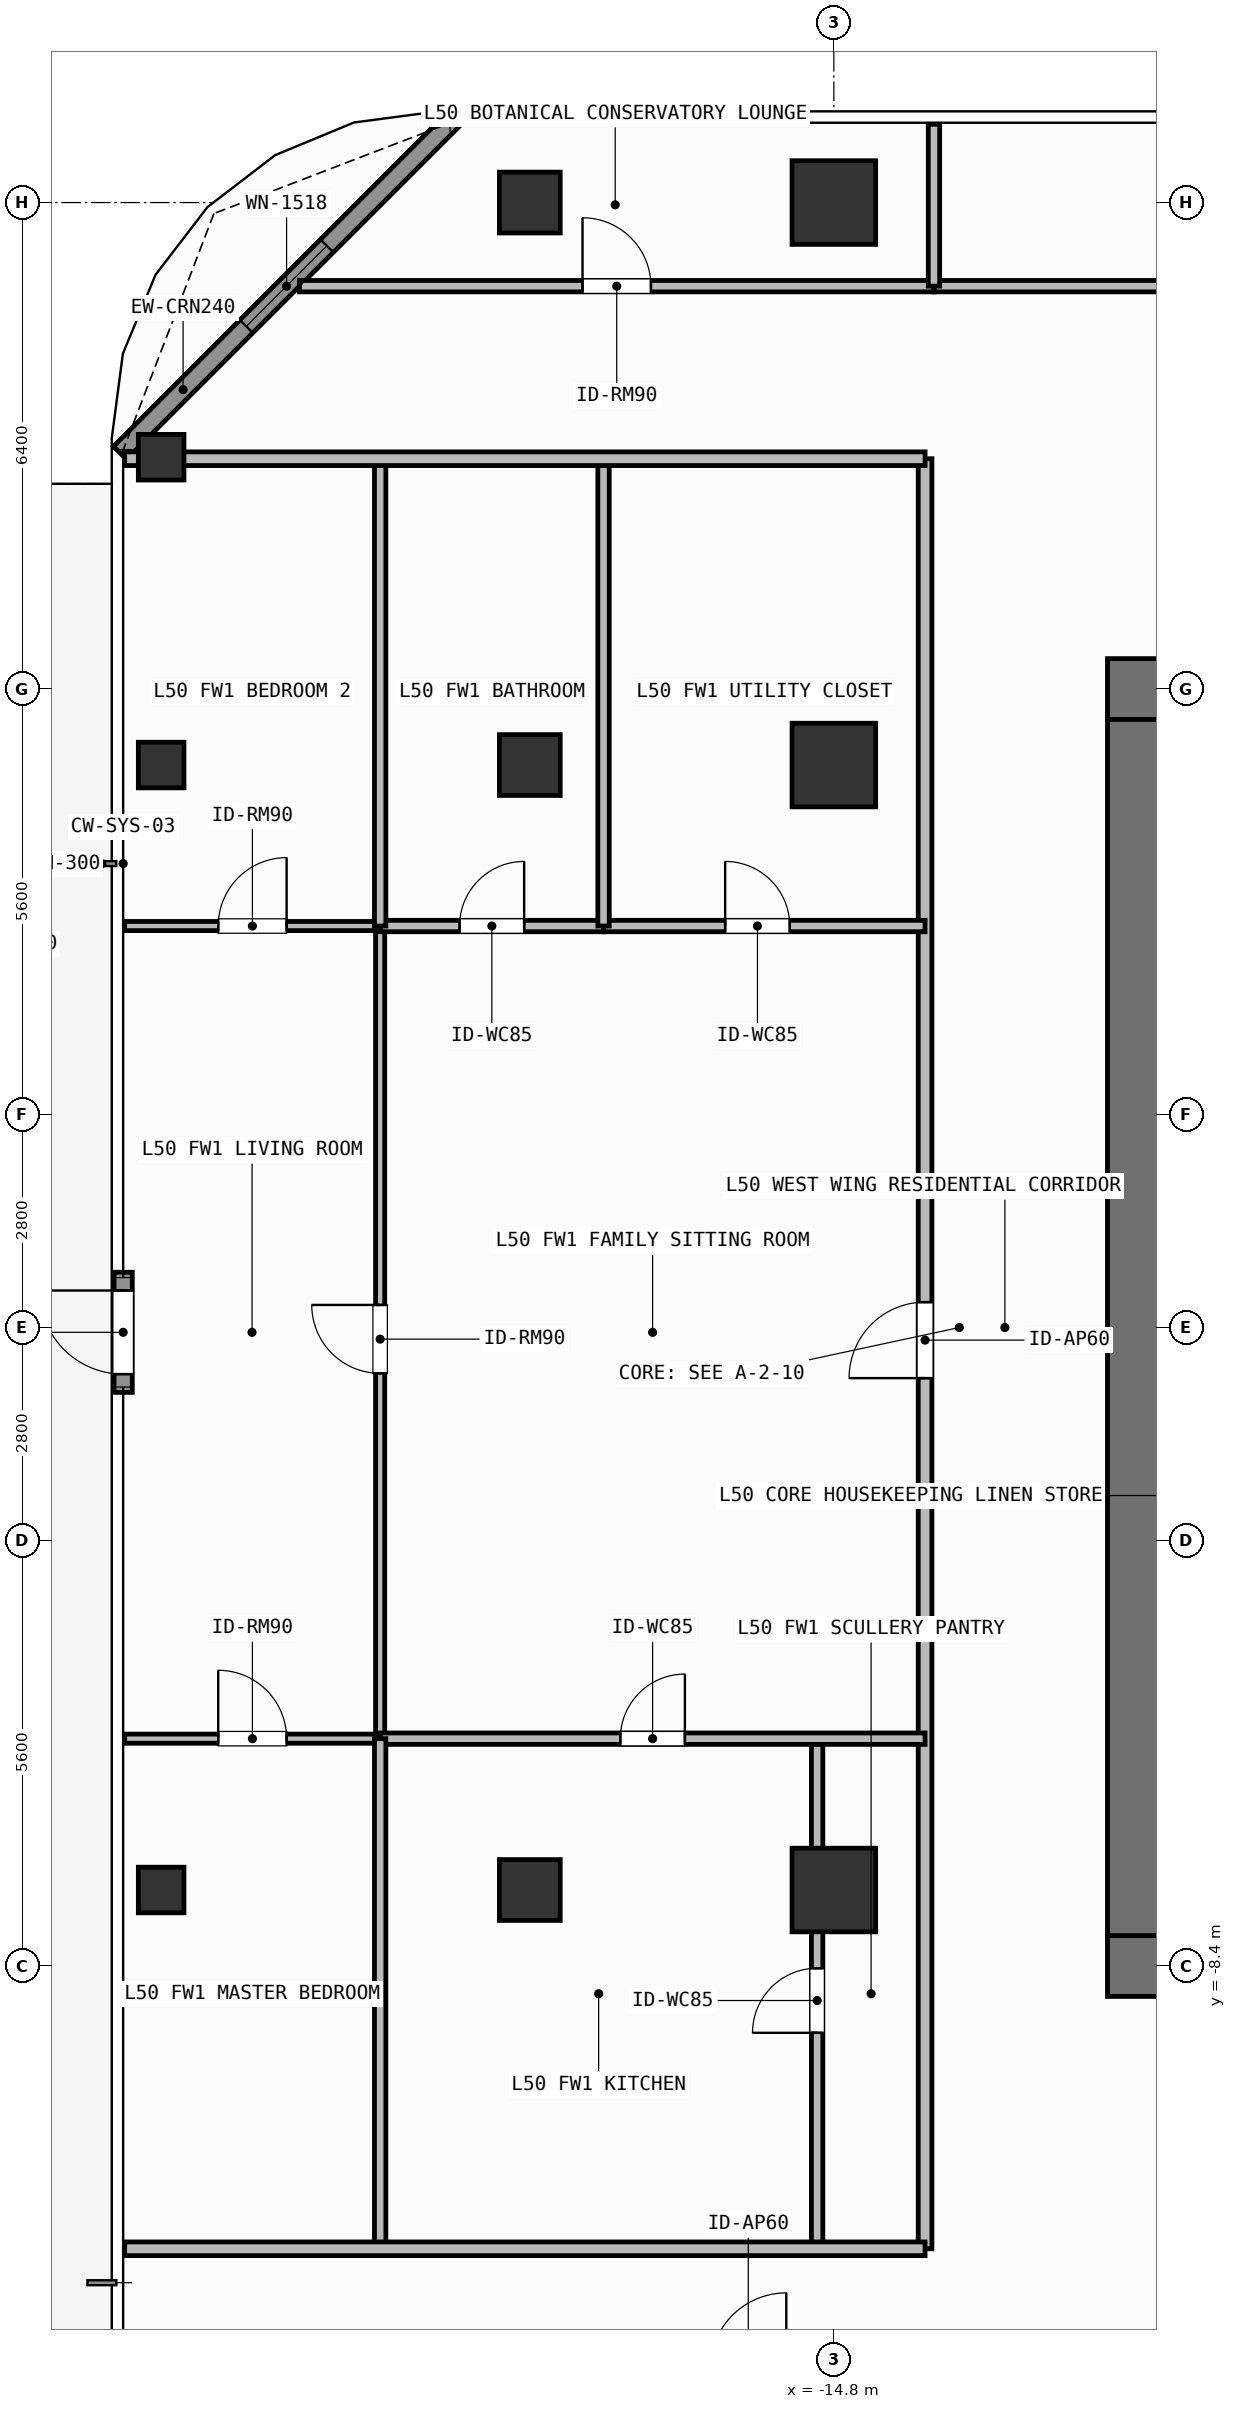
"""IFC4 building model, lengths in metres.
Left out: names, types, materials, properties, quantities, classifications, styles, units other than length and angle.
Written with IfcOpenShell. Run it as: python <this file> out.ifc"""

import sys

from ifc_helpers import new_model, si_unit, direction, frame, frame_2d, origin, origin_2d, place, context, subcontext, project, spatial, rectangle, hollow_rectangle, extrude, element, fill, save


model = new_model("IFC4")
c1 = context("Model", 3, precision=1e-05, world=origin(), true_north=direction((0.0, 1.0)))
c2 = subcontext(c1, "Body", "Model", "MODEL_VIEW")
j1 = project(units=[si_unit("LENGTHUNIT", "METRE"), si_unit("PLANEANGLEUNIT", "RADIAN")], contexts=[c1])
p1 = place(None, origin())
s1 = spatial("IfcSite", under=j1, at=p1, CompositionType="ELEMENT")
p2 = place(p1, origin())
s2 = spatial("IfcBuilding", under=s1, at=p2, CompositionType="ELEMENT")
p3 = place(p2, frame((0.0, 0.0, 203.1)))
s3 = spatial("IfcBuildingStorey", under=s2, at=p3, CompositionType="ELEMENT", Elevation=203.1)
for number, where, z_axis, x_axis in (
    (1, (-11.2, -8.4, 0.0), (0.0, 0.0, 1.0), (1.0, 0.0, 0.0)),
    (2, (-11.2, 8.4, 0.0), (0.0, 0.0, 1.0), (1.0, 0.0, 0.0)),
):
    element("IfcWall", number, at=place(p3, frame(where, z_axis=z_axis, x_axis=x_axis)), inside=s3, PredefinedType="SHEAR", context=c2, shape_type="SweptSolid", body=[
        extrude(rectangle(XDim=1.5, YDim=0.8, at=frame_2d((0.75, 0.0))), origin(), (0.0, 0.0, 1.0), 3.9),
    ])
p4 = place(p3, frame((-10.8, -8.0, 0.0), z_axis=(0.0, 0.0, 1.0), x_axis=(0.0, 1.0, 0.0)))
e3 = element("IfcWall", 3, at=p4, inside=s3, PredefinedType="SHEAR", context=c2, shape_type="SweptSolid", body=[
    extrude(rectangle(XDim=16.0, YDim=0.8, at=frame_2d((8.0, 0.0))), origin(), (0.0, 0.0, 1.0), 3.9),
])
for number, where, z_axis, x_axis in (
    (4, (-14.8, 14.8, 0.0), (0.0, 0.0, 1.0), (1.0, 0.0, 0.0)),
    (5, (-14.8, -7.4, 0.0), (0.0, 0.0, 1.0), (1.0, 0.0, 0.0)),
    (6, (-14.8, 7.4, 0.0), (0.0, 0.0, 1.0), (1.0, 0.0, 0.0)),
):
    element("IfcColumn", number, at=place(p3, frame(where, z_axis=z_axis, x_axis=x_axis)), inside=s3, PredefinedType="COLUMN", context=c2, shape_type="SweptSolid", body=[
        extrude(rectangle(XDim=1.1, YDim=1.1, at=origin_2d()), origin(), (0.0, 0.0, 1.0), 3.9),
    ])
for number, where, z_axis, x_axis in (
    (7, (-18.8, -7.4, 0.0), (0.0, 0.0, 1.0), (1.0, 0.0, 0.0)),
    (8, (-18.8, 7.4, 0.0), (0.0, 0.0, 1.0), (1.0, 0.0, 0.0)),
    (9, (-18.8, 14.8, 0.0), (0.0, 0.0, 1.0), (1.0, 0.0, 0.0)),
):
    element("IfcColumn", number, at=place(p3, frame(where, z_axis=z_axis, x_axis=x_axis)), inside=s3, PredefinedType="COLUMN", context=c2, shape_type="SweptSolid", body=[
        extrude(hollow_rectangle(XDim=0.8, YDim=0.8, WallThickness=0.036, at=origin_2d()), origin(), (0.0, 0.0, 1.0), 3.9),
    ])
for number, where, z_axis, x_axis in (
    (10, (-23.65, 11.45, 0.0), (0.0, 0.0, 1.0), (1.0, 0.0, 0.0)),
    (11, (-23.65, -7.4, 0.0), (0.0, 0.0, 1.0), (1.0, 0.0, 0.0)),
    (12, (-23.65, 7.4, 0.0), (0.0, 0.0, 1.0), (1.0, 0.0, 0.0)),
):
    element("IfcColumn", number, at=place(p3, frame(where, z_axis=z_axis, x_axis=x_axis)), inside=s3, PredefinedType="COLUMN", context=c2, shape_type="SweptSolid", body=[
        extrude(hollow_rectangle(XDim=0.6, YDim=0.6, WallThickness=0.028, at=origin_2d()), origin(), (0.0, 0.0, 1.0), 3.9),
    ])
p5 = place(p3, frame((-24.15, -0.853, 0.0), z_axis=(0.0, 0.0, 1.0), x_axis=(0.0, 1.0, 0.0)))
e13 = element("IfcWall", 13, at=p5, inside=s3, PredefinedType="SOLIDWALL", context=c2, shape_type="SweptSolid", body=[
    extrude(rectangle(XDim=1.58, YDim=0.24, at=frame_2d((0.79, 0.0))), origin(), (0.0, 0.0, 1.0), 3.68),
])
p6 = place(p5, frame((0.24, 0.0, 0.0)))
e14 = element("IfcOpeningElement", 14, at=p6, cuts=e13, PredefinedType="OPENING", context=c2, shape_type="SweptSolid", body=[
    extrude(rectangle(XDim=1.1, YDim=2.2, at=frame_2d((0.55, 1.1))), frame((0.0, 0.13, 0.0), z_axis=(0.0, -1.0, 0.0), x_axis=(1.0, 0.0, 0.0)), (0.0, 0.0, 1.0), 0.26),
])
p7 = place(p3, frame((-24.192, 11.508, 0.0), z_axis=(0.0, 0.0, 1.0), x_axis=(0.707106781187, 0.707106781187, 0.0)))
e15 = element("IfcWall", 15, at=p7, inside=s3, PredefinedType="SOLIDWALL", context=c2, shape_type="SweptSolid", body=[
    extrude(rectangle(XDim=6.201, YDim=0.24, at=frame_2d((3.101, 0.0))), origin(), (0.0, 0.0, 1.0), 3.68),
])
p8 = place(p7, frame((2.351, 0.0, 0.8)))
e16 = element("IfcOpeningElement", 16, at=p8, cuts=e15, PredefinedType="OPENING", context=c2, shape_type="SweptSolid", body=[
    extrude(rectangle(XDim=1.5, YDim=1.85, at=frame_2d((0.75, 0.925))), frame((0.0, 0.13, 0.0), z_axis=(0.0, -1.0, 0.0), x_axis=(1.0, 0.0, 0.0)), (0.0, 0.0, 1.0), 0.26),
])
p9 = place(p3, frame((-21.83, 13.7, 0.0), z_axis=(0.0, 0.0, 1.0), x_axis=(1.0, 0.0, 0.0)))
e17 = element("IfcWall", 17, at=p9, inside=s3, PredefinedType="PARTITIONING", context=c2, shape_type="SweptSolid", body=[
    extrude(rectangle(XDim=8.347, YDim=0.15, at=frame_2d((4.174, 0.0))), origin(), (0.0, 0.0, 1.0), 3.68),
])
p10 = place(p9, frame((3.723, 0.0, 0.0)))
e18 = element("IfcOpeningElement", 18, at=p10, cuts=e17, PredefinedType="OPENING", context=c2, shape_type="SweptSolid", body=[
    extrude(rectangle(XDim=0.9, YDim=2.1, at=frame_2d((0.45, 1.05))), frame((0.0, 0.085, 0.0), z_axis=(0.0, -1.0, 0.0), x_axis=(1.0, 0.0, 0.0)), (0.0, 0.0, 1.0), 0.17),
])
p11 = place(p3, frame((-13.483, 13.7, 0.0), z_axis=(0.0, 0.0, 1.0), x_axis=(1.0, 0.0, 0.0)))
e19 = element("IfcWall", 19, at=p11, inside=s3, PredefinedType="PARTITIONING", context=c2, shape_type="SweptSolid", body=[
    extrude(rectangle(XDim=13.58, YDim=0.15, at=frame_2d((6.79, 0.0))), origin(), (0.0, 0.0, 1.0), 3.68),
])
p12 = place(p11, frame((6.788, 0.0, 0.0)))
e20 = element("IfcOpeningElement", 20, at=p12, cuts=e19, PredefinedType="OPENING", context=c2, shape_type="SweptSolid", body=[
    extrude(rectangle(XDim=0.9, YDim=2.1, at=frame_2d((0.45, 1.05))), frame((0.0, 0.085, 0.0), z_axis=(0.0, -1.0, 0.0), x_axis=(1.0, 0.0, 0.0)), (0.0, 0.0, 1.0), 0.17),
])
p13 = place(p3, frame((-13.6, -12.12, 0.0), z_axis=(0.0, 0.0, 1.0), x_axis=(0.0, 1.0, 0.0)))
e21 = element("IfcWall", 21, at=p13, inside=s3, PredefinedType="PARTITIONING", context=c2, shape_type="SweptSolid", body=[
    extrude(rectangle(XDim=23.55, YDim=0.18, at=frame_2d((11.775, 0.0))), origin(), (0.0, 0.0, 1.0), 3.68),
])
p14 = place(p13, frame((11.454, 0.0, 0.0)))
e22 = element("IfcOpeningElement", 22, at=p14, cuts=e21, PredefinedType="OPENING", context=c2, shape_type="SweptSolid", body=[
    extrude(rectangle(XDim=1.0, YDim=2.2, at=frame_2d((0.5, 1.1))), frame((0.0, 0.1, 0.0), z_axis=(0.0, -1.0, 0.0), x_axis=(1.0, 0.0, 0.0)), (0.0, 0.0, 1.0), 0.2),
])
p15 = place(p3, frame((-20.769, -5.409, 0.0), z_axis=(0.0, 0.0, 1.0), x_axis=(0.0, 1.0, 0.0)))
e23 = element("IfcWall", 23, at=p15, inside=s3, PredefinedType="PARTITIONING", context=c2, shape_type="SweptSolid", body=[
    extrude(rectangle(XDim=10.691, YDim=0.12, at=frame_2d((5.345, 0.0))), origin(), (0.0, 0.0, 1.0), 3.68),
])
p16 = place(p15, frame((4.806, 0.0, 0.0)))
e24 = element("IfcOpeningElement", 24, at=p16, cuts=e23, PredefinedType="OPENING", context=c2, shape_type="SweptSolid", body=[
    extrude(rectangle(XDim=0.9, YDim=2.1, at=frame_2d((0.45, 1.05))), frame((0.0, 0.07, 0.0), z_axis=(0.0, -1.0, 0.0), x_axis=(1.0, 0.0, 0.0)), (0.0, 0.0, 1.0), 0.14),
])
p17 = place(p3, frame((-15.02, -12.12, 0.0), z_axis=(0.0, 0.0, 1.0), x_axis=(0.0, 1.0, 0.0)))
e25 = element("IfcWall", 25, at=p17, inside=s3, PredefinedType="PARTITIONING", context=c2, shape_type="SweptSolid", body=[
    extrude(rectangle(XDim=6.711, YDim=0.15, at=frame_2d((3.355, 0.0))), origin(), (0.0, 0.0, 1.0), 3.182),
])
p18 = place(p17, frame((2.841, 0.0, 0.0)))
e26 = element("IfcOpeningElement", 26, at=p18, cuts=e25, PredefinedType="OPENING", context=c2, shape_type="SweptSolid", body=[
    extrude(rectangle(XDim=0.85, YDim=2.1, at=frame_2d((0.425, 1.05))), frame((0.0, 0.085, 0.0), z_axis=(0.0, -1.0, 0.0), x_axis=(1.0, 0.0, 0.0)), (0.0, 0.0, 1.0), 0.17),
])
p19 = place(p3, frame((-20.769, 5.282, 0.0), z_axis=(0.0, 0.0, 1.0), x_axis=(1.0, 0.0, 0.0)))
e27 = element("IfcWall", 27, at=p19, inside=s3, PredefinedType="PARTITIONING", context=c2, shape_type="SweptSolid", body=[
    extrude(rectangle(XDim=2.939, YDim=0.15, at=frame_2d((1.469, 0.0))), origin(), (0.0, 0.0, 1.0), 3.68),
])
p20 = place(p19, frame((1.044, 0.0, 0.0)))
e28 = element("IfcOpeningElement", 28, at=p20, cuts=e27, PredefinedType="OPENING", context=c2, shape_type="SweptSolid", body=[
    extrude(rectangle(XDim=0.85, YDim=2.1, at=frame_2d((0.425, 1.05))), frame((0.0, 0.085, 0.0), z_axis=(0.0, -1.0, 0.0), x_axis=(1.0, 0.0, 0.0)), (0.0, 0.0, 1.0), 0.17),
])
p21 = place(p3, frame((-17.83, 5.282, 0.0), z_axis=(0.0, 0.0, 1.0), x_axis=(1.0, 0.0, 0.0)))
e29 = element("IfcWall", 29, at=p21, inside=s3, PredefinedType="PARTITIONING", context=c2, shape_type="SweptSolid", body=[
    extrude(rectangle(XDim=4.23, YDim=0.15, at=frame_2d((2.115, 0.0))), origin(), (0.0, 0.0, 1.0), 3.68),
])
p22 = place(p21, frame((1.6, 0.0, 0.0)))
e30 = element("IfcOpeningElement", 30, at=p22, cuts=e29, PredefinedType="OPENING", context=c2, shape_type="SweptSolid", body=[
    extrude(rectangle(XDim=0.85, YDim=2.1, at=frame_2d((0.425, 1.05))), frame((0.0, 0.085, 0.0), z_axis=(0.0, -1.0, 0.0), x_axis=(1.0, 0.0, 0.0)), (0.0, 0.0, 1.0), 0.17),
])
p23 = place(p3, frame((-20.769, -5.409, 0.0), z_axis=(0.0, 0.0, 1.0), x_axis=(1.0, 0.0, 0.0)))
e31 = element("IfcWall", 31, at=p23, inside=s3, PredefinedType="PARTITIONING", context=c2, shape_type="SweptSolid", body=[
    extrude(rectangle(XDim=7.169, YDim=0.15, at=frame_2d((3.584, 0.0))), origin(), (0.0, 0.0, 1.0), 3.68),
])
p24 = place(p23, frame((3.159, 0.0, 0.0)))
e32 = element("IfcOpeningElement", 32, at=p24, cuts=e31, PredefinedType="OPENING", context=c2, shape_type="SweptSolid", body=[
    extrude(rectangle(XDim=0.85, YDim=2.1, at=frame_2d((0.425, 1.05))), frame((0.0, 0.085, 0.0), z_axis=(0.0, -1.0, 0.0), x_axis=(1.0, 0.0, 0.0)), (0.0, 0.0, 1.0), 0.17),
])
p25 = place(p3, frame((-24.13, -5.409, 0.0), z_axis=(0.0, 0.0, 1.0), x_axis=(1.0, 0.0, 0.0)))
e33 = element("IfcWall", 33, at=p25, inside=s3, PredefinedType="PARTITIONING", context=c2, shape_type="SweptSolid", body=[
    extrude(rectangle(XDim=3.361, YDim=0.12, at=frame_2d((1.68, 0.0))), origin(), (0.0, 0.0, 1.0), 3.68),
])
p26 = place(p25, frame((1.23, 0.0, 0.0)))
e34 = element("IfcOpeningElement", 34, at=p26, cuts=e33, PredefinedType="OPENING", context=c2, shape_type="SweptSolid", body=[
    extrude(rectangle(XDim=0.9, YDim=2.1, at=frame_2d((0.45, 1.05))), frame((0.0, 0.07, 0.0), z_axis=(0.0, -1.0, 0.0), x_axis=(1.0, 0.0, 0.0)), (0.0, 0.0, 1.0), 0.14),
])
p27 = place(p3, frame((-24.13, 5.282, 0.0), z_axis=(0.0, 0.0, 1.0), x_axis=(1.0, 0.0, 0.0)))
e35 = element("IfcWall", 35, at=p27, inside=s3, PredefinedType="PARTITIONING", context=c2, shape_type="SweptSolid", body=[
    extrude(rectangle(XDim=3.361, YDim=0.12, at=frame_2d((1.68, 0.0))), origin(), (0.0, 0.0, 1.0), 3.68),
])
p28 = place(p27, frame((1.23, 0.0, 0.0)))
e36 = element("IfcOpeningElement", 36, at=p28, cuts=e35, PredefinedType="OPENING", context=c2, shape_type="SweptSolid", body=[
    extrude(rectangle(XDim=0.9, YDim=2.1, at=frame_2d((0.45, 1.05))), frame((0.0, 0.07, 0.0), z_axis=(0.0, -1.0, 0.0), x_axis=(1.0, 0.0, 0.0)), (0.0, 0.0, 1.0), 0.14),
])
p29 = place(p3, frame((-13.483, 13.7, 0.0), z_axis=(0.0, 0.0, 1.0), x_axis=(0.0, 1.0, 0.0)))
e37 = element("IfcWall", 37, at=p29, inside=s3, PredefinedType="PARTITIONING", context=c2, shape_type="SweptSolid", body=[
    extrude(rectangle(XDim=2.13, YDim=0.15, at=frame_2d((1.065, 0.0))), origin(), (0.0, 0.0, 1.0), 3.68),
])
p30 = place(p3, frame((-17.83, 5.282, 0.0), z_axis=(0.0, 0.0, 1.0), x_axis=(0.0, 1.0, 0.0)))
e38 = element("IfcWall", 38, at=p30, inside=s3, PredefinedType="PARTITIONING", context=c2, shape_type="SweptSolid", body=[
    extrude(rectangle(XDim=6.148, YDim=0.15, at=frame_2d((3.074, 0.0))), origin(), (0.0, 0.0, 1.0), 3.68),
])
p31 = place(p3, frame((-20.769, -12.12, 0.0), z_axis=(0.0, 0.0, 1.0), x_axis=(0.0, 1.0, 0.0)))
e39 = element("IfcWall", 39, at=p31, inside=s3, PredefinedType="PARTITIONING", context=c2, shape_type="SweptSolid", body=[
    extrude(rectangle(XDim=6.711, YDim=0.15, at=frame_2d((3.355, 0.0))), origin(), (0.0, 0.0, 1.0), 3.68),
])
p32 = place(p3, frame((-20.769, 5.282, 0.0), z_axis=(0.0, 0.0, 1.0), x_axis=(0.0, 1.0, 0.0)))
e40 = element("IfcWall", 40, at=p32, inside=s3, PredefinedType="PARTITIONING", context=c2, shape_type="SweptSolid", body=[
    extrude(rectangle(XDim=6.148, YDim=0.15, at=frame_2d((3.074, 0.0))), origin(), (0.0, 0.0, 1.0), 3.68),
])
p33 = place(p3, frame((-24.13, -12.12, 0.0), z_axis=(0.0, 0.0, 1.0), x_axis=(1.0, 0.0, 0.0)))
e41 = element("IfcWall", 41, at=p33, inside=s3, PredefinedType="PARTITIONING", context=c2, shape_type="SweptSolid", body=[
    extrude(rectangle(XDim=10.53, YDim=0.18, at=frame_2d((5.265, 0.0))), origin(), (0.0, 0.0, 1.0), 3.68),
])
p34 = place(p3, frame((-24.13, 11.43, 0.0), z_axis=(0.0, 0.0, 1.0), x_axis=(1.0, 0.0, 0.0)))
e42 = element("IfcWall", 42, at=p34, inside=s3, PredefinedType="PARTITIONING", context=c2, shape_type="SweptSolid", body=[
    extrude(rectangle(XDim=10.53, YDim=0.18, at=frame_2d((5.265, 0.0))), origin(), (0.0, 0.0, 1.0), 3.42),
])
p35 = place(p6, origin())
e43 = element("IfcDoor", 43, at=p35, inside=s3, OperationType="SINGLE_SWING_RIGHT", PredefinedType="DOOR", context=c2, shape_type="SweptSolid", body=[
    extrude(rectangle(XDim=1.1, YDim=2.2, at=frame_2d((0.55, 1.1))), frame((0.0, 0.025, 0.0), z_axis=(0.0, -1.0, 0.0), x_axis=(1.0, 0.0, 0.0)), (0.0, 0.0, 1.0), 0.05),
])
fill(e14, e43)
p36 = place(p8, origin())
e44 = element("IfcWindow", 44, at=p36, inside=s3, PartitioningType="SINGLE_PANEL", PredefinedType="WINDOW", context=c2, shape_type="SweptSolid", body=[
    extrude(rectangle(XDim=1.5, YDim=1.85, at=frame_2d((0.75, 0.925))), frame((0.0, 0.03, 0.0), z_axis=(0.0, -1.0, 0.0), x_axis=(1.0, 0.0, 0.0)), (0.0, 0.0, 1.0), 0.06),
])
fill(e16, e44)
p37 = place(p10, origin())
e45 = element("IfcDoor", 45, at=p37, inside=s3, OperationType="SINGLE_SWING_LEFT", PredefinedType="DOOR", context=c2, shape_type="SweptSolid", body=[
    extrude(rectangle(XDim=0.9, YDim=2.1, at=frame_2d((0.45, 1.05))), frame((0.0, 0.025, 0.0), z_axis=(0.0, -1.0, 0.0), x_axis=(1.0, 0.0, 0.0)), (0.0, 0.0, 1.0), 0.05),
])
fill(e18, e45)
p38 = place(p14, origin())
e46 = element("IfcDoor", 46, at=p38, inside=s3, OperationType="SINGLE_SWING_LEFT", PredefinedType="DOOR", context=c2, shape_type="SweptSolid", body=[
    extrude(rectangle(XDim=1.0, YDim=2.2, at=frame_2d((0.5, 1.1))), frame((0.0, 0.025, 0.0), z_axis=(0.0, -1.0, 0.0), x_axis=(1.0, 0.0, 0.0)), (0.0, 0.0, 1.0), 0.05),
])
fill(e22, e46)
p39 = place(p16, origin())
e47 = element("IfcDoor", 47, at=p39, inside=s3, OperationType="SINGLE_SWING_RIGHT", PredefinedType="DOOR", context=c2, shape_type="SweptSolid", body=[
    extrude(rectangle(XDim=0.9, YDim=2.1, at=frame_2d((0.45, 1.05))), frame((0.0, 0.025, 0.0), z_axis=(0.0, -1.0, 0.0), x_axis=(1.0, 0.0, 0.0)), (0.0, 0.0, 1.0), 0.05),
])
fill(e24, e47)
p40 = place(p18, origin())
e48 = element("IfcDoor", 48, at=p40, inside=s3, OperationType="SINGLE_SWING_LEFT", PredefinedType="DOOR", context=c2, shape_type="SweptSolid", body=[
    extrude(rectangle(XDim=0.85, YDim=2.1, at=frame_2d((0.425, 1.05))), frame((0.0, 0.025, 0.0), z_axis=(0.0, -1.0, 0.0), x_axis=(1.0, 0.0, 0.0)), (0.0, 0.0, 1.0), 0.05),
])
fill(e26, e48)
p41 = place(p20, origin())
e49 = element("IfcDoor", 49, at=p41, inside=s3, OperationType="SINGLE_SWING_RIGHT", PredefinedType="DOOR", context=c2, shape_type="SweptSolid", body=[
    extrude(rectangle(XDim=0.85, YDim=2.1, at=frame_2d((0.425, 1.05))), frame((0.0, 0.025, 0.0), z_axis=(0.0, -1.0, 0.0), x_axis=(1.0, 0.0, 0.0)), (0.0, 0.0, 1.0), 0.05),
])
fill(e28, e49)
p42 = place(p22, origin())
e50 = element("IfcDoor", 50, at=p42, inside=s3, OperationType="SINGLE_SWING_LEFT", PredefinedType="DOOR", context=c2, shape_type="SweptSolid", body=[
    extrude(rectangle(XDim=0.85, YDim=2.1, at=frame_2d((0.425, 1.05))), frame((0.0, 0.025, 0.0), z_axis=(0.0, -1.0, 0.0), x_axis=(1.0, 0.0, 0.0)), (0.0, 0.0, 1.0), 0.05),
])
fill(e30, e50)
p43 = place(p24, origin())
e51 = element("IfcDoor", 51, at=p43, inside=s3, OperationType="SINGLE_SWING_RIGHT", PredefinedType="DOOR", context=c2, shape_type="SweptSolid", body=[
    extrude(rectangle(XDim=0.85, YDim=2.1, at=frame_2d((0.425, 1.05))), frame((0.0, 0.025, 0.0), z_axis=(0.0, -1.0, 0.0), x_axis=(1.0, 0.0, 0.0)), (0.0, 0.0, 1.0), 0.05),
])
fill(e32, e51)
p44 = place(p26, origin())
e52 = element("IfcDoor", 52, at=p44, inside=s3, OperationType="SINGLE_SWING_LEFT", PredefinedType="DOOR", context=c2, shape_type="SweptSolid", body=[
    extrude(rectangle(XDim=0.9, YDim=2.1, at=frame_2d((0.45, 1.05))), frame((0.0, 0.025, 0.0), z_axis=(0.0, -1.0, 0.0), x_axis=(1.0, 0.0, 0.0)), (0.0, 0.0, 1.0), 0.05),
])
fill(e34, e52)
p45 = place(p28, origin())
e53 = element("IfcDoor", 53, at=p45, inside=s3, OperationType="SINGLE_SWING_RIGHT", PredefinedType="DOOR", context=c2, shape_type="SweptSolid", body=[
    extrude(rectangle(XDim=0.9, YDim=2.1, at=frame_2d((0.45, 1.05))), frame((0.0, 0.025, 0.0), z_axis=(0.0, -1.0, 0.0), x_axis=(1.0, 0.0, 0.0)), (0.0, 0.0, 1.0), 0.05),
])
fill(e36, e53)
save(model, sys.argv[1])
